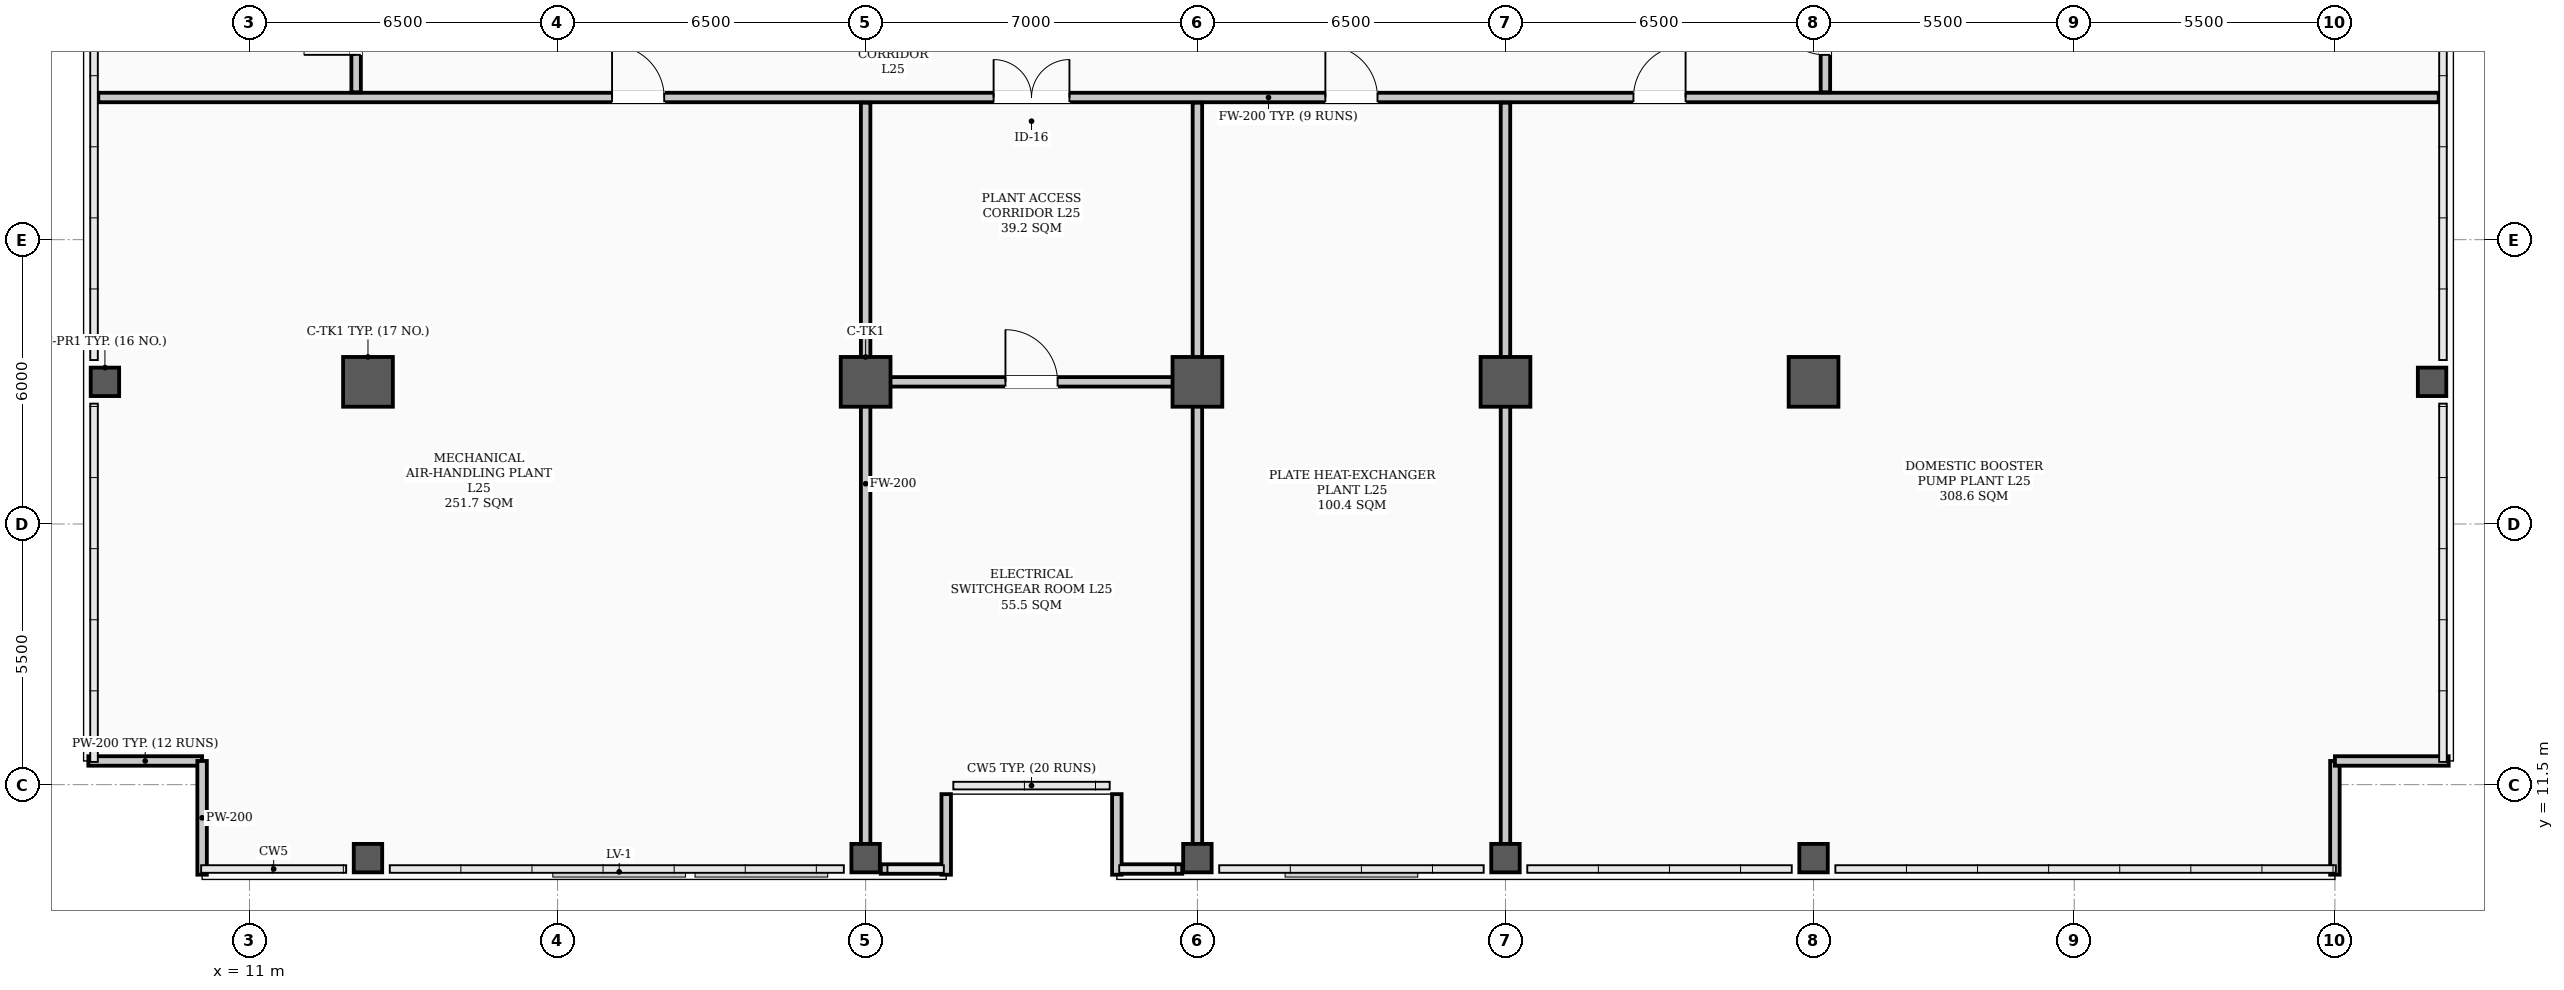
"""IFC4 building model, lengths in metres.
Left out: names, types, materials, properties, quantities, classifications, styles, units other than length and angle.
Written with IfcOpenShell. Run it as: python <this file> out.ifc"""

import sys

from ifc_helpers import new_model, si_unit, direction, frame, frame_2d, origin, origin_2d, place, context, subcontext, project, spatial, rectangle, hollow_rectangle, extrude, element, fill, save


model = new_model("IFC4")
c1 = context("Model", 3, precision=1e-05, world=origin(), true_north=direction((0.0, 1.0)))
c2 = subcontext(c1, "Body", "Model", "MODEL_VIEW")
j1 = project(units=[si_unit("LENGTHUNIT", "METRE"), si_unit("PLANEANGLEUNIT", "RADIAN")], contexts=[c1])
p1 = place(None, origin())
s1 = spatial("IfcSite", under=j1, at=p1, CompositionType="ELEMENT")
p2 = place(p1, origin())
s2 = spatial("IfcBuilding", under=s1, at=p2, CompositionType="ELEMENT")
p3 = place(p2, frame((0.0, 0.0, 100.6)))
s3 = spatial("IfcBuildingStorey", under=s2, at=p3, CompositionType="ELEMENT", Elevation=100.6)
for number, where, z_axis, x_axis in (
    (1, (13.5, 20.0, 0.0), (0.0, 0.0, 1.0), (1.0, 0.0, 0.0)),
    (2, (24.0, 20.0, 0.0), (0.0, 0.0, 1.0), (1.0, 0.0, 0.0)),
    (3, (31.0, 20.0, 0.0), (0.0, 0.0, 1.0), (1.0, 0.0, 0.0)),
    (4, (37.5, 20.0, 0.0), (0.0, 0.0, 1.0), (1.0, 0.0, 0.0)),
    (5, (44.0, 20.0, 0.0), (0.0, 0.0, 1.0), (1.0, 0.0, 0.0)),
):
    element("IfcColumn", number, at=place(p3, frame(where, z_axis=z_axis, x_axis=x_axis)), inside=s3, PredefinedType="COLUMN", context=c2, shape_type="SweptSolid", body=[
        extrude(hollow_rectangle(XDim=1.05, YDim=1.05, WallThickness=0.038, InnerFilletRadius=0.019, OuterFilletRadius=0.057, at=origin_2d()), origin(), (0.0, 0.0, 1.0), 5.4),
    ])
for number, where, z_axis, x_axis in (
    (6, (7.95, 20.0, 0.0), (0.0, 0.0, 1.0), (1.0, 0.0, 0.0)),
    (7, (13.5, 9.95, 0.0), (0.0, 0.0, 1.0), (1.0, 0.0, 0.0)),
    (8, (24.0, 9.95, 0.0), (0.0, 0.0, 1.0), (1.0, 0.0, 0.0)),
    (9, (31.0, 9.95, 0.0), (0.0, 0.0, 1.0), (1.0, 0.0, 0.0)),
    (10, (37.5, 9.95, 0.0), (0.0, 0.0, 1.0), (1.0, 0.0, 0.0)),
    (11, (44.0, 9.95, 0.0), (0.0, 0.0, 1.0), (1.0, 0.0, 0.0)),
    (12, (57.05, 20.0, 0.0), (0.0, 0.0, 1.0), (1.0, 0.0, 0.0)),
):
    element("IfcColumn", number, at=place(p3, frame(where, z_axis=z_axis, x_axis=x_axis)), inside=s3, PredefinedType="COLUMN", context=c2, shape_type="SweptSolid", body=[
        extrude(hollow_rectangle(XDim=0.6, YDim=0.6, WallThickness=0.026, InnerFilletRadius=0.013, OuterFilletRadius=0.039, at=origin_2d()), origin(), (0.0, 0.0, 1.0), 5.4),
    ])
for number, where, z_axis, x_axis in (
    (13, (24.32, 9.72, 0.0), (0.0, 0.0, 1.0), (1.0, 0.0, 0.0)),
    (14, (29.35, 9.72, 0.0), (0.0, 0.0, 1.0), (1.0, 0.0, 0.0)),
):
    element("IfcWall", number, at=place(p3, frame(where, z_axis=z_axis, x_axis=x_axis)), inside=s3, PredefinedType="PARAPET", context=c2, shape_type="SweptSolid", body=[
        extrude(rectangle(XDim=1.33, YDim=0.2, at=frame_2d((0.665, 0.0))), origin(), (0.0, 0.0, 1.0), 1.2),
    ])
for number, where, z_axis, x_axis in (
    (15, (7.6, 12.0, 0.0), (0.0, 0.0, 1.0), (1.0, 0.0, 0.0)),
    (16, (10.0, 12.0, 0.0), (0.0, 0.0, 1.0), (0.0, -1.0, 0.0)),
    (17, (55.0, 9.6, 0.0), (0.0, 0.0, 1.0), (0.0, 1.0, 0.0)),
    (18, (55.0, 12.0, 0.0), (0.0, 0.0, 1.0), (1.0, 0.0, 0.0)),
):
    element("IfcWall", number, at=place(p3, frame(where, z_axis=z_axis, x_axis=x_axis)), inside=s3, PredefinedType="PARAPET", context=c2, shape_type="SweptSolid", body=[
        extrude(rectangle(XDim=2.4, YDim=0.2, at=frame_2d((1.2, 0.0))), origin(), (0.0, 0.0, 1.0), 1.2),
    ])
for number, where, z_axis, x_axis in (
    (19, (25.7, 9.6, 0.0), (0.0, 0.0, 1.0), (0.0, 1.0, 0.0)),
    (20, (29.3, 11.3, 0.0), (0.0, 0.0, 1.0), (0.0, -1.0, 0.0)),
):
    element("IfcWall", number, at=place(p3, frame(where, z_axis=z_axis, x_axis=x_axis)), inside=s3, PredefinedType="PARAPET", context=c2, shape_type="SweptSolid", body=[
        extrude(rectangle(XDim=1.7, YDim=0.2, at=frame_2d((0.85, 0.0))), origin(), (0.0, 0.0, 1.0), 1.2),
    ])
p4 = place(p3, frame((7.81, 26.0, 0.0), z_axis=(0.0, 0.0, 1.0), x_axis=(1.0, 0.0, 0.0)))
e21 = element("IfcWall", 21, at=p4, inside=s3, PredefinedType="STANDARD", context=c2, shape_type="SweptSolid", body=[
    extrude(rectangle(XDim=49.38, YDim=0.2, at=frame_2d((24.69, 0.0))), origin(), (0.0, 0.0, 1.0), 4.6),
])
p5 = place(p4, frame((10.84, 0.0, 0.0)))
e22 = element("IfcOpeningElement", 22, at=p5, cuts=e21, PredefinedType="OPENING", context=c2, shape_type="SweptSolid", body=[
    extrude(rectangle(XDim=1.1, YDim=2.08, at=frame_2d((0.55, 1.04))), frame((0.0, 0.11, 0.0), z_axis=(0.0, -1.0, 0.0), x_axis=(1.0, 0.0, 0.0)), (0.0, 0.0, 1.0), 0.22),
])
p6 = place(p4, frame((18.89, 0.0, 0.0)))
e23 = element("IfcOpeningElement", 23, at=p6, cuts=e21, PredefinedType="OPENING", context=c2, shape_type="SweptSolid", body=[
    extrude(rectangle(XDim=1.6, YDim=2.08, at=frame_2d((0.8, 1.04))), frame((0.0, 0.11, 0.0), z_axis=(0.0, -1.0, 0.0), x_axis=(1.0, 0.0, 0.0)), (0.0, 0.0, 1.0), 0.22),
])
p7 = place(p4, frame((25.89, 0.0, 0.0)))
e24 = element("IfcOpeningElement", 24, at=p7, cuts=e21, PredefinedType="OPENING", context=c2, shape_type="SweptSolid", body=[
    extrude(rectangle(XDim=1.1, YDim=2.08, at=frame_2d((0.55, 1.04))), frame((0.0, 0.11, 0.0), z_axis=(0.0, -1.0, 0.0), x_axis=(1.0, 0.0, 0.0)), (0.0, 0.0, 1.0), 0.22),
])
p8 = place(p4, frame((32.39, 0.0, 0.0)))
e25 = element("IfcOpeningElement", 25, at=p8, cuts=e21, PredefinedType="OPENING", context=c2, shape_type="SweptSolid", body=[
    extrude(rectangle(XDim=1.1, YDim=2.08, at=frame_2d((0.55, 1.04))), frame((0.0, 0.11, 0.0), z_axis=(0.0, -1.0, 0.0), x_axis=(1.0, 0.0, 0.0)), (0.0, 0.0, 1.0), 0.22),
])
p9 = place(p3, frame((24.0, 20.0, 0.0), z_axis=(0.0, 0.0, 1.0), x_axis=(1.0, 0.0, 0.0)))
e26 = element("IfcWall", 26, at=p9, inside=s3, PredefinedType="STANDARD", context=c2, shape_type="SweptSolid", body=[
    extrude(rectangle(XDim=7.0, YDim=0.2, at=frame_2d((3.5, 0.0))), origin(), (0.0, 0.0, 1.0), 4.5),
])
p10 = place(p9, frame((2.95, 0.0, 0.0)))
e27 = element("IfcOpeningElement", 27, at=p10, cuts=e26, PredefinedType="OPENING", context=c2, shape_type="SweptSolid", body=[
    extrude(rectangle(XDim=1.1, YDim=2.08, at=frame_2d((0.55, 1.04))), frame((0.0, 0.11, 0.0), z_axis=(0.0, -1.0, 0.0), x_axis=(1.0, 0.0, 0.0)), (0.0, 0.0, 1.0), 0.22),
])
p11 = place(p3, frame((13.25, 26.11, 0.0), z_axis=(0.0, 0.0, 1.0), x_axis=(0.0, 1.0, 0.0)))
e28 = element("IfcWall", 28, at=p11, inside=s3, PredefinedType="STANDARD", context=c2, shape_type="SweptSolid", body=[
    extrude(rectangle(XDim=3.24, YDim=0.2, at=frame_2d((1.62, 0.0))), origin(), (0.0, 0.0, 1.0), 4.5),
])
p12 = place(p11, frame((0.79, 0.0, 0.0)))
e29 = element("IfcOpeningElement", 29, at=p12, cuts=e28, PredefinedType="OPENING", context=c2, shape_type="SweptSolid", body=[
    extrude(rectangle(XDim=1.1, YDim=2.08, at=frame_2d((0.55, 1.04))), frame((0.0, 0.11, 0.0), z_axis=(0.0, -1.0, 0.0), x_axis=(1.0, 0.0, 0.0)), (0.0, 0.0, 1.0), 0.22),
])
p13 = place(p3, frame((44.25, 26.11, 0.0), z_axis=(0.0, 0.0, 1.0), x_axis=(0.0, 1.0, 0.0)))
e30 = element("IfcWall", 30, at=p13, inside=s3, PredefinedType="STANDARD", context=c2, shape_type="SweptSolid", body=[
    extrude(rectangle(XDim=3.24, YDim=0.2, at=frame_2d((1.62, 0.0))), origin(), (0.0, 0.0, 1.0), 4.5),
])
p14 = place(p13, frame((0.79, 0.0, 0.0)))
e31 = element("IfcOpeningElement", 31, at=p14, cuts=e30, PredefinedType="OPENING", context=c2, shape_type="SweptSolid", body=[
    extrude(rectangle(XDim=1.1, YDim=2.08, at=frame_2d((0.55, 1.04))), frame((0.0, 0.11, 0.0), z_axis=(0.0, -1.0, 0.0), x_axis=(1.0, 0.0, 0.0)), (0.0, 0.0, 1.0), 0.22),
])
for number, where, z_axis, x_axis in (
    (32, (24.0, 9.81, 0.0), (0.0, 0.0, 1.0), (0.0, 1.0, 0.0)),
    (33, (31.0, 9.81, 0.0), (0.0, 0.0, 1.0), (0.0, 1.0, 0.0)),
    (34, (37.5, 9.81, 0.0), (0.0, 0.0, 1.0), (0.0, 1.0, 0.0)),
):
    element("IfcWall", number, at=place(p3, frame(where, z_axis=z_axis, x_axis=x_axis)), inside=s3, PredefinedType="STANDARD", context=c2, shape_type="SweptSolid", body=[
        extrude(rectangle(XDim=16.08, YDim=0.2, at=frame_2d((8.04, 0.0))), origin(), (0.0, 0.0, 1.0), 4.5),
    ])
p15 = place(p12, origin())
e35 = element("IfcDoor", 35, at=p15, inside=s3, OperationType="SINGLE_SWING_LEFT", PredefinedType="DOOR", context=c2, shape_type="SweptSolid", body=[
    extrude(rectangle(XDim=1.1, YDim=2.08, at=frame_2d((0.55, 1.04))), frame((0.0, 0.025, 0.0), z_axis=(0.0, -1.0, 0.0), x_axis=(1.0, 0.0, 0.0)), (0.0, 0.0, 1.0), 0.05),
])
fill(e29, e35)
p16 = place(p14, origin())
e36 = element("IfcDoor", 36, at=p16, inside=s3, OperationType="SINGLE_SWING_RIGHT", PredefinedType="DOOR", context=c2, shape_type="SweptSolid", body=[
    extrude(rectangle(XDim=1.1, YDim=2.08, at=frame_2d((0.55, 1.04))), frame((0.0, 0.025, 0.0), z_axis=(0.0, -1.0, 0.0), x_axis=(1.0, 0.0, 0.0)), (0.0, 0.0, 1.0), 0.05),
])
fill(e31, e36)
p17 = place(p5, origin())
e37 = element("IfcDoor", 37, at=p17, inside=s3, OperationType="SINGLE_SWING_LEFT", PredefinedType="DOOR", context=c2, shape_type="SweptSolid", body=[
    extrude(rectangle(XDim=1.1, YDim=2.08, at=frame_2d((0.55, 1.04))), frame((0.0, 0.025, 0.0), z_axis=(0.0, -1.0, 0.0), x_axis=(1.0, 0.0, 0.0)), (0.0, 0.0, 1.0), 0.05),
])
fill(e22, e37)
p18 = place(p6, origin())
e38 = element("IfcDoor", 38, at=p18, inside=s3, OperationType="DOUBLE_DOOR_SINGLE_SWING", PredefinedType="DOOR", context=c2, shape_type="SweptSolid", body=[
    extrude(rectangle(XDim=1.6, YDim=2.08, at=frame_2d((0.8, 1.04))), frame((0.0, 0.025, 0.0), z_axis=(0.0, -1.0, 0.0), x_axis=(1.0, 0.0, 0.0)), (0.0, 0.0, 1.0), 0.05),
])
fill(e23, e38)
p19 = place(p7, origin())
e39 = element("IfcDoor", 39, at=p19, inside=s3, OperationType="SINGLE_SWING_LEFT", PredefinedType="DOOR", context=c2, shape_type="SweptSolid", body=[
    extrude(rectangle(XDim=1.1, YDim=2.08, at=frame_2d((0.55, 1.04))), frame((0.0, 0.025, 0.0), z_axis=(0.0, -1.0, 0.0), x_axis=(1.0, 0.0, 0.0)), (0.0, 0.0, 1.0), 0.05),
])
fill(e24, e39)
p20 = place(p8, origin())
e40 = element("IfcDoor", 40, at=p20, inside=s3, OperationType="SINGLE_SWING_RIGHT", PredefinedType="DOOR", context=c2, shape_type="SweptSolid", body=[
    extrude(rectangle(XDim=1.1, YDim=2.08, at=frame_2d((0.55, 1.04))), frame((0.0, 0.025, 0.0), z_axis=(0.0, -1.0, 0.0), x_axis=(1.0, 0.0, 0.0)), (0.0, 0.0, 1.0), 0.05),
])
fill(e25, e40)
p21 = place(p10, origin())
e41 = element("IfcDoor", 41, at=p21, inside=s3, OperationType="SINGLE_SWING_LEFT", PredefinedType="DOOR", context=c2, shape_type="SweptSolid", body=[
    extrude(rectangle(XDim=1.1, YDim=2.08, at=frame_2d((0.55, 1.04))), frame((0.0, 0.025, 0.0), z_axis=(0.0, -1.0, 0.0), x_axis=(1.0, 0.0, 0.0)), (0.0, 0.0, 1.0), 0.05),
])
fill(e27, e41)
save(model, sys.argv[1])
